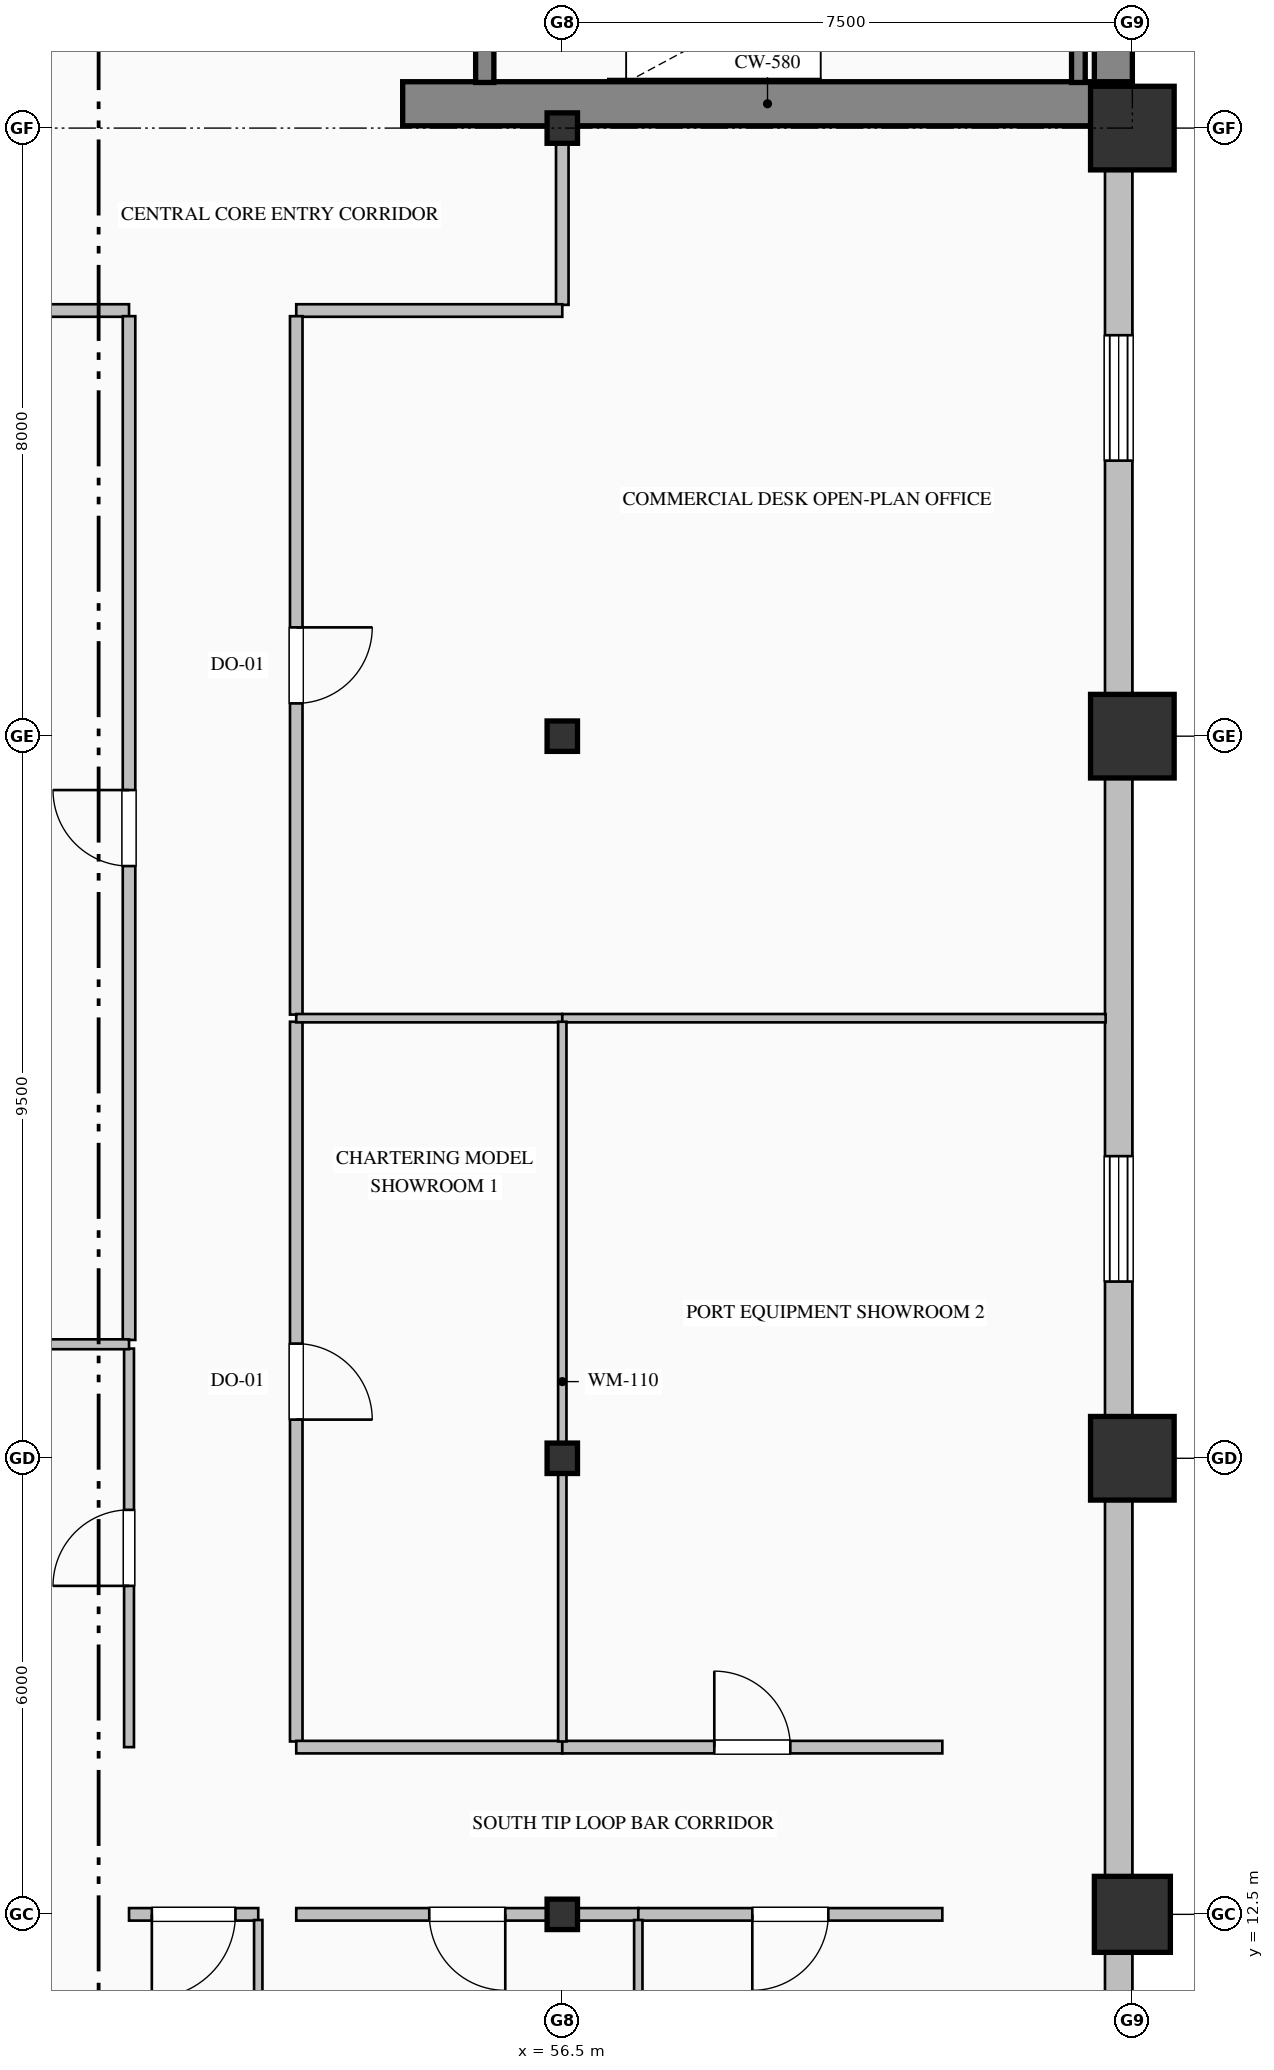
"""IFC4 building model, lengths in metres.
Left out: names, types, materials, properties, quantities, classifications, styles, units other than length and angle.
Written with IfcOpenShell. Run it as: python <this file> out.ifc"""

import sys

from ifc_helpers import new_model, si_unit, direction, frame, frame_2d, origin, origin_2d, place, context, subcontext, project, spatial, rectangle, hollow_rectangle, hollow_circle, i_section, extrude, element, fill, save


model = new_model("IFC4")
c1 = context("Model", 3, precision=1e-05, world=origin(), true_north=direction((0.0, 1.0)))
c2 = subcontext(c1, "Body", "Model", "MODEL_VIEW")
j1 = project(units=[si_unit("LENGTHUNIT", "METRE"), si_unit("PLANEANGLEUNIT", "RADIAN")], contexts=[c1])
p1 = place(None, origin())
s1 = spatial("IfcSite", under=j1, at=p1, CompositionType="ELEMENT")
p2 = place(p1, origin())
s2 = spatial("IfcBuilding", under=s1, at=p2, CompositionType="ELEMENT")
p3 = place(p2, frame((0.0, 0.0, 179.0)))
s3 = spatial("IfcBuildingStorey", under=s2, at=p3, CompositionType="ELEMENT", Elevation=179.0)
p4 = place(p3, frame((63.75, 36.32, 0.0), z_axis=(0.0, 0.0, 1.0), x_axis=(0.0, 1.0, 0.0)))
e1 = element("IfcWall", 1, at=p4, inside=s3, PredefinedType="SHEAR", context=c2, shape_type="SweptSolid", body=[
    extrude(rectangle(XDim=15.18, YDim=0.5, at=frame_2d((7.59, 0.0))), origin(), (0.0, 0.0, 1.0), 3.765),
])
p5 = place(p3, frame((54.4, 36.32, 0.0), z_axis=(0.0, 0.0, 1.0), x_axis=(1.0, 0.0, 0.0)))
e2 = element("IfcWall", 2, at=p5, inside=s3, PredefinedType="SHEAR", context=c2, shape_type="SweptSolid", body=[
    extrude(rectangle(XDim=9.6, YDim=0.58, at=frame_2d((4.8, 0.0))), origin(), (0.0, 0.0, 1.0), 4.0),
])
for number, where, z_axis, x_axis in (
    (3, (56.5, 12.5, 0.0), (0.0, 0.0, 1.0), (1.0, 0.0, 0.0)),
    (4, (56.5, 18.5, 0.0), (0.0, 0.0, 1.0), (1.0, 0.0, 0.0)),
    (5, (56.5, 28.0, 0.0), (0.0, 0.0, 1.0), (1.0, 0.0, 0.0)),
    (6, (56.5, 36.0, 0.0), (0.0, 0.0, 1.0), (1.0, 0.0, 0.0)),
):
    element("IfcColumn", number, at=place(p3, frame(where, z_axis=z_axis, x_axis=x_axis)), inside=s3, PredefinedType="COLUMN", context=c2, shape_type="SweptSolid", body=[
        extrude(i_section(OverallWidth=0.4, OverallDepth=0.4, WebThickness=0.013, FlangeThickness=0.021, FilletRadius=0.022, at=origin_2d()), origin(), (0.0, 0.0, 1.0), 4.0),
    ])
p6 = place(p3, frame((64.0, 12.5, 0.0), z_axis=(0.0, 0.0, 1.0), x_axis=(1.0, 0.0, 0.0)))
e7 = element("IfcColumn", 7, at=p6, inside=s3, PredefinedType="COLUMN", context=c2, shape_type="SweptSolid", body=[
    extrude(hollow_circle(Radius=0.5, WallThickness=0.036, at=origin_2d()), origin(), (0.0, 0.0, 1.0), 4.0),
])
for number, where, z_axis, x_axis in (
    (8, (64.0, 18.5, 0.0), (0.0, 0.0, 1.0), (1.0, 0.0, 0.0)),
    (9, (64.0, 28.0, 0.0), (0.0, 0.0, 1.0), (1.0, 0.0, 0.0)),
    (10, (64.0, 36.0, 0.0), (0.0, 0.0, 1.0), (1.0, 0.0, 0.0)),
):
    element("IfcColumn", number, at=place(p3, frame(where, z_axis=z_axis, x_axis=x_axis)), inside=s3, PredefinedType="COLUMN", context=c2, shape_type="SweptSolid", body=[
        extrude(hollow_rectangle(XDim=1.1, YDim=1.1, WallThickness=0.04, at=origin_2d()), origin(), (0.0, 0.0, 1.0), 4.0),
    ])
p7 = place(p3, frame((63.82, 36.05, 0.0), z_axis=(0.0, 0.0, 1.0), x_axis=(0.0, -1.0, 0.0)))
e11 = element("IfcWall", 11, at=p7, inside=s3, PredefinedType="SOLIDWALL", context=c2, shape_type="SweptSolid", body=[
    extrude(rectangle(XDim=28.05, YDim=0.36, at=frame_2d((14.025, 0.0))), origin(), (0.0, 0.0, 1.0), 3.265),
])
p8 = place(p7, frame((2.775, 0.0, 0.85)))
e12 = element("IfcOpeningElement", 12, at=p8, cuts=e11, PredefinedType="OPENING", context=c2, shape_type="SweptSolid", body=[
    extrude(rectangle(XDim=1.65, YDim=1.95, at=frame_2d((0.825, 0.975))), frame((0.0, 0.19, 0.0), z_axis=(0.0, -1.0, 0.0), x_axis=(1.0, 0.0, 0.0)), (0.0, 0.0, 1.0), 0.38),
])
p9 = place(p7, frame((13.575, 0.0, 0.85)))
e13 = element("IfcOpeningElement", 13, at=p9, cuts=e11, PredefinedType="OPENING", context=c2, shape_type="SweptSolid", body=[
    extrude(rectangle(XDim=1.65, YDim=1.95, at=frame_2d((0.825, 0.975))), frame((0.0, 0.19, 0.0), z_axis=(0.0, -1.0, 0.0), x_axis=(1.0, 0.0, 0.0)), (0.0, 0.0, 1.0), 0.38),
])
p10 = place(p3, frame((55.48, 39.75, 0.0), z_axis=(0.0, 0.0, 1.0), x_axis=(0.0, -1.0, 0.0)))
e14 = element("IfcWall", 14, at=p10, inside=s3, PredefinedType="SOLIDWALL", context=c2, shape_type="SweptSolid", body=[
    extrude(rectangle(XDim=3.15, YDim=0.24, at=frame_2d((1.575, 0.0))), origin(), (0.0, 0.0, 1.0), 4.0),
])
p11 = place(p10, frame((1.0, 0.0, 0.0)))
e15 = element("IfcOpeningElement", 15, at=p11, cuts=e14, PredefinedType="OPENING", context=c2, shape_type="SweptSolid", body=[
    extrude(rectangle(XDim=1.15, YDim=2.2, at=frame_2d((0.575, 1.1))), frame((0.0, 0.13, 0.0), z_axis=(0.0, -1.0, 0.0), x_axis=(1.0, 0.0, 0.0)), (0.0, 0.0, 1.0), 0.26),
])
p12 = place(p3, frame((63.29, 36.6, 0.0), z_axis=(0.0, 0.0, 1.0), x_axis=(0.0, 1.0, 0.0)))
e16 = element("IfcWall", 16, at=p12, inside=s3, PredefinedType="SOLIDWALL", context=c2, shape_type="SweptSolid", body=[
    extrude(rectangle(XDim=3.15, YDim=0.18, at=frame_2d((1.575, 0.0))), origin(), (0.0, 0.0, 1.0), 4.0),
])
p13 = place(p3, frame((56.5, 36.0, 0.0), z_axis=(0.0, 0.0, 1.0), x_axis=(0.0, -1.0, 0.0)))
e17 = element("IfcWall", 17, at=p13, inside=s3, PredefinedType="PARTITIONING", context=c2, shape_type="SweptSolid", body=[
    extrude(rectangle(XDim=2.325, YDim=0.165, at=frame_2d((1.163, 0.0))), origin(), (0.0, 0.0, 1.0), 3.157),
])
p14 = place(p3, frame((56.5, 33.6, 0.0), z_axis=(0.0, 0.0, 1.0), x_axis=(-1.0, 0.0, 0.0)))
e18 = element("IfcWall", 18, at=p14, inside=s3, PredefinedType="PARTITIONING", context=c2, shape_type="SweptSolid", body=[
    extrude(rectangle(XDim=3.5, YDim=0.165, at=frame_2d((1.75, 0.0))), origin(), (0.0, 0.0, 1.0), 3.765),
])
p15 = place(p3, frame((50.8, 33.6, 0.0), z_axis=(0.0, 0.0, 1.0), x_axis=(-1.0, 0.0, 0.0)))
e19 = element("IfcWall", 19, at=p15, inside=s3, PredefinedType="PARTITIONING", context=c2, shape_type="SweptSolid", body=[
    extrude(rectangle(XDim=10.3, YDim=0.165, at=frame_2d((5.15, 0.0))), origin(), (0.0, 0.0, 1.0), 3.765),
])
p16 = place(p3, frame((53.0, 33.525, 0.0), z_axis=(0.0, 0.0, 1.0), x_axis=(0.0, -1.0, 0.0)))
e20 = element("IfcWall", 20, at=p16, inside=s3, PredefinedType="PARTITIONING", context=c2, shape_type="SweptSolid", body=[
    extrude(rectangle(XDim=9.188, YDim=0.165, at=frame_2d((4.594, 0.0))), origin(), (0.0, 0.0, 1.0), 3.765),
])
p17 = place(p16, frame((4.094, 0.0, 0.0)))
e21 = element("IfcOpeningElement", 21, at=p17, cuts=e20, PredefinedType="OPENING", context=c2, shape_type="SweptSolid", body=[
    extrude(rectangle(XDim=1.0, YDim=2.15, at=frame_2d((0.5, 1.075))), frame((0.0, 0.093, 0.0), z_axis=(0.0, -1.0, 0.0), x_axis=(1.0, 0.0, 0.0)), (0.0, 0.0, 1.0), 0.185),
])
p18 = place(p3, frame((53.0, 24.243, 0.0), z_axis=(0.0, 0.0, 1.0), x_axis=(0.0, -1.0, 0.0)))
e22 = element("IfcWall", 22, at=p18, inside=s3, PredefinedType="PARTITIONING", context=c2, shape_type="SweptSolid", body=[
    extrude(rectangle(XDim=9.469, YDim=0.165, at=frame_2d((4.734, 0.0))), origin(), (0.0, 0.0, 1.0), 3.765),
])
p19 = place(p18, frame((4.234, 0.0, 0.0)))
e23 = element("IfcOpeningElement", 23, at=p19, cuts=e22, PredefinedType="OPENING", context=c2, shape_type="SweptSolid", body=[
    extrude(rectangle(XDim=1.0, YDim=2.15, at=frame_2d((0.5, 1.075))), frame((0.0, 0.093, 0.0), z_axis=(0.0, -1.0, 0.0), x_axis=(1.0, 0.0, 0.0)), (0.0, 0.0, 1.0), 0.185),
])
p20 = place(p3, frame((50.8, 14.7, 0.0), z_axis=(0.0, 0.0, 1.0), x_axis=(0.0, 1.0, 0.0)))
e24 = element("IfcWall", 24, at=p20, inside=s3, PredefinedType="PARTITIONING", context=c2, shape_type="SweptSolid", body=[
    extrude(rectangle(XDim=5.243, YDim=0.13, at=frame_2d((2.622, 0.0))), origin(), (0.0, 0.0, 1.0), 3.765),
])
p21 = place(p20, frame((2.122, 0.0, 0.0)))
e25 = element("IfcOpeningElement", 25, at=p21, cuts=e24, PredefinedType="OPENING", context=c2, shape_type="SweptSolid", body=[
    extrude(rectangle(XDim=1.0, YDim=2.15, at=frame_2d((0.5, 1.075))), frame((0.0, 0.075, 0.0), z_axis=(0.0, -1.0, 0.0), x_axis=(1.0, 0.0, 0.0)), (0.0, 0.0, 1.0), 0.15),
])
p22 = place(p3, frame((50.8, 20.057, 0.0), z_axis=(0.0, 0.0, 1.0), x_axis=(0.0, 1.0, 0.0)))
e26 = element("IfcWall", 26, at=p22, inside=s3, PredefinedType="PARTITIONING", context=c2, shape_type="SweptSolid", body=[
    extrude(rectangle(XDim=13.469, YDim=0.165, at=frame_2d((6.734, 0.0))), origin(), (0.0, 0.0, 1.0), 3.765),
])
p23 = place(p22, frame((6.234, 0.0, 0.0)))
e27 = element("IfcOpeningElement", 27, at=p23, cuts=e26, PredefinedType="OPENING", context=c2, shape_type="SweptSolid", body=[
    extrude(rectangle(XDim=1.0, YDim=2.15, at=frame_2d((0.5, 1.075))), frame((0.0, 0.093, 0.0), z_axis=(0.0, -1.0, 0.0), x_axis=(1.0, 0.0, 0.0)), (0.0, 0.0, 1.0), 0.185),
])
p24 = place(p3, frame((52.5, 12.5, 0.0), z_axis=(0.0, 0.0, 1.0), x_axis=(-1.0, 0.0, 0.0)))
e28 = element("IfcWall", 28, at=p24, inside=s3, PredefinedType="PARTITIONING", context=c2, shape_type="SweptSolid", body=[
    extrude(rectangle(XDim=1.7, YDim=0.165, at=frame_2d((0.85, 0.0))), origin(), (0.0, 0.0, 1.0), 3.157),
])
p25 = place(p24, frame((0.3, 0.0, 0.0)))
e29 = element("IfcOpeningElement", 29, at=p25, cuts=e28, PredefinedType="OPENING", context=c2, shape_type="SweptSolid", body=[
    extrude(rectangle(XDim=1.1, YDim=2.2, at=frame_2d((0.55, 1.1))), frame((0.0, 0.093, 0.0), z_axis=(0.0, -1.0, 0.0), x_axis=(1.0, 0.0, 0.0)), (0.0, 0.0, 1.0), 0.185),
])
p26 = place(p3, frame((53.0, 14.7, 0.0), z_axis=(0.0, 0.0, 1.0), x_axis=(1.0, 0.0, 0.0)))
e30 = element("IfcWall", 30, at=p26, inside=s3, PredefinedType="PARTITIONING", context=c2, shape_type="SweptSolid", body=[
    extrude(rectangle(XDim=3.5, YDim=0.165, at=frame_2d((1.75, 0.0))), origin(), (0.0, 0.0, 1.0), 3.765),
])
p27 = place(p3, frame((56.5, 14.7, 0.0), z_axis=(0.0, 0.0, 1.0), x_axis=(1.0, 0.0, 0.0)))
e31 = element("IfcWall", 31, at=p27, inside=s3, PredefinedType="PARTITIONING", context=c2, shape_type="SweptSolid", body=[
    extrude(rectangle(XDim=5.0, YDim=0.165, at=frame_2d((2.5, 0.0))), origin(), (0.0, 0.0, 1.0), 3.765),
])
p28 = place(p27, frame((2.0, 0.0, 0.0)))
e32 = element("IfcOpeningElement", 32, at=p28, cuts=e31, PredefinedType="OPENING", context=c2, shape_type="SweptSolid", body=[
    extrude(rectangle(XDim=1.0, YDim=2.15, at=frame_2d((0.5, 1.075))), frame((0.0, 0.093, 0.0), z_axis=(0.0, -1.0, 0.0), x_axis=(1.0, 0.0, 0.0)), (0.0, 0.0, 1.0), 0.185),
])
p29 = place(p3, frame((57.5, 12.5, 0.0), z_axis=(0.0, 0.0, 1.0), x_axis=(-1.0, 0.0, 0.0)))
e33 = element("IfcWall", 33, at=p29, inside=s3, PredefinedType="PARTITIONING", context=c2, shape_type="SweptSolid", body=[
    extrude(rectangle(XDim=4.5, YDim=0.165, at=frame_2d((2.25, 0.0))), origin(), (0.0, 0.0, 1.0), 3.157),
])
p30 = place(p29, frame((1.75, 0.0, 0.0)))
e34 = element("IfcOpeningElement", 34, at=p30, cuts=e33, PredefinedType="OPENING", context=c2, shape_type="SweptSolid", body=[
    extrude(rectangle(XDim=1.0, YDim=2.15, at=frame_2d((0.5, 1.075))), frame((0.0, 0.093, 0.0), z_axis=(0.0, -1.0, 0.0), x_axis=(1.0, 0.0, 0.0)), (0.0, 0.0, 1.0), 0.185),
])
p31 = place(p3, frame((61.5, 12.5, 0.0), z_axis=(0.0, 0.0, 1.0), x_axis=(-1.0, 0.0, 0.0)))
e35 = element("IfcWall", 35, at=p31, inside=s3, PredefinedType="PARTITIONING", context=c2, shape_type="SweptSolid", body=[
    extrude(rectangle(XDim=4.0, YDim=0.165, at=frame_2d((2.0, 0.0))), origin(), (0.0, 0.0, 1.0), 3.157),
])
p32 = place(p31, frame((1.5, 0.0, 0.0)))
e36 = element("IfcOpeningElement", 36, at=p32, cuts=e35, PredefinedType="OPENING", context=c2, shape_type="SweptSolid", body=[
    extrude(rectangle(XDim=1.0, YDim=2.15, at=frame_2d((0.5, 1.075))), frame((0.0, 0.093, 0.0), z_axis=(0.0, -1.0, 0.0), x_axis=(1.0, 0.0, 0.0)), (0.0, 0.0, 1.0), 0.185),
])
p33 = place(p3, frame((56.5, 24.29, 0.0), z_axis=(0.0, 0.0, 1.0), x_axis=(-1.0, 0.0, 0.0)))
e37 = element("IfcWall", 37, at=p33, inside=s3, PredefinedType="MOVABLE", context=c2, shape_type="SweptSolid", body=[
    extrude(rectangle(XDim=3.5, YDim=0.11, at=frame_2d((1.75, 0.0))), origin(), (0.0, 0.0, 1.0), 3.765),
])
p34 = place(p3, frame((63.648, 24.29, 0.0), z_axis=(0.0, 0.0, 1.0), x_axis=(-1.0, 0.0, 0.0)))
e38 = element("IfcWall", 38, at=p34, inside=s3, PredefinedType="MOVABLE", context=c2, shape_type="SweptSolid", body=[
    extrude(rectangle(XDim=7.148, YDim=0.11, at=frame_2d((3.574, 0.0))), origin(), (0.0, 0.0, 1.0), 3.765),
])
p35 = place(p3, frame((56.5, 24.243, 0.0), z_axis=(0.0, 0.0, 1.0), x_axis=(0.0, -1.0, 0.0)))
e39 = element("IfcWall", 39, at=p35, inside=s3, PredefinedType="MOVABLE", context=c2, shape_type="SweptSolid", body=[
    extrude(rectangle(XDim=9.469, YDim=0.11, at=frame_2d((4.734, 0.0))), origin(), (0.0, 0.0, 1.0), 2.957),
])
p36 = place(p3, frame((40.852, 20.0, 0.0), z_axis=(0.0, 0.0, 1.0), x_axis=(1.0, 0.0, 0.0)))
e40 = element("IfcWall", 40, at=p36, inside=s3, PredefinedType="PARTITIONING", context=c2, shape_type="SweptSolid", body=[
    extrude(rectangle(XDim=9.948, YDim=0.13, at=frame_2d((4.974, 0.0))), origin(), (0.0, 0.0, 1.0), 3.765),
])
for number, where, z_axis, x_axis in (
    (41, (52.5, 12.426, 0.0), (0.0, 0.0, 1.0), (0.0, -1.0, 0.0)),
    (42, (57.5, 12.426, 0.0), (0.0, 0.0, 1.0), (0.0, -1.0, 0.0)),
):
    element("IfcWall", number, at=place(p3, frame(where, z_axis=z_axis, x_axis=x_axis)), inside=s3, PredefinedType="MOVABLE", context=c2, shape_type="SweptSolid", body=[
        extrude(rectangle(XDim=8.073, YDim=0.11, at=frame_2d((4.037, 0.0))), origin(), (0.0, 0.0, 1.0), 3.765),
    ])
p37 = place(p8, origin())
e43 = element("IfcWindow", 43, at=p37, inside=s3, PartitioningType="DOUBLE_PANEL_VERTICAL", PredefinedType="WINDOW", context=c2, shape_type="SweptSolid", body=[
    extrude(rectangle(XDim=1.65, YDim=1.95, at=frame_2d((0.825, 0.975))), frame((0.0, 0.15, 0.0), z_axis=(0.0, -1.0, 0.0), x_axis=(1.0, 0.0, 0.0)), (0.0, 0.0, 1.0), 0.06),
])
fill(e12, e43)
p38 = place(p9, origin())
e44 = element("IfcWindow", 44, at=p38, inside=s3, PartitioningType="DOUBLE_PANEL_VERTICAL", PredefinedType="WINDOW", context=c2, shape_type="SweptSolid", body=[
    extrude(rectangle(XDim=1.65, YDim=1.95, at=frame_2d((0.825, 0.975))), frame((0.0, 0.15, 0.0), z_axis=(0.0, -1.0, 0.0), x_axis=(1.0, 0.0, 0.0)), (0.0, 0.0, 1.0), 0.06),
])
fill(e13, e44)
p39 = place(p17, origin())
e45 = element("IfcDoor", 45, at=p39, inside=s3, OperationType="SINGLE_SWING_LEFT", PredefinedType="DOOR", context=c2, shape_type="SweptSolid", body=[
    extrude(rectangle(XDim=1.0, YDim=2.15, at=frame_2d((0.5, 1.075))), frame((0.0, 0.025, 0.0), z_axis=(0.0, -1.0, 0.0), x_axis=(1.0, 0.0, 0.0)), (0.0, 0.0, 1.0), 0.05),
])
fill(e21, e45)
p40 = place(p19, origin())
e46 = element("IfcDoor", 46, at=p40, inside=s3, OperationType="SINGLE_SWING_RIGHT", PredefinedType="DOOR", context=c2, shape_type="SweptSolid", body=[
    extrude(rectangle(XDim=1.0, YDim=2.15, at=frame_2d((0.5, 1.075))), frame((0.0, 0.025, 0.0), z_axis=(0.0, -1.0, 0.0), x_axis=(1.0, 0.0, 0.0)), (0.0, 0.0, 1.0), 0.05),
])
fill(e23, e46)
p41 = place(p28, origin())
e47 = element("IfcDoor", 47, at=p41, inside=s3, OperationType="SINGLE_SWING_LEFT", PredefinedType="DOOR", context=c2, shape_type="SweptSolid", body=[
    extrude(rectangle(XDim=1.0, YDim=2.15, at=frame_2d((0.5, 1.075))), frame((0.0, 0.025, 0.0), z_axis=(0.0, -1.0, 0.0), x_axis=(1.0, 0.0, 0.0)), (0.0, 0.0, 1.0), 0.05),
])
fill(e32, e47)
p42 = place(p21, origin())
e48 = element("IfcDoor", 48, at=p42, inside=s3, OperationType="SINGLE_SWING_LEFT", PredefinedType="DOOR", context=c2, shape_type="SweptSolid", body=[
    extrude(rectangle(XDim=1.0, YDim=2.15, at=frame_2d((0.5, 1.075))), frame((0.0, 0.025, 0.0), z_axis=(0.0, -1.0, 0.0), x_axis=(1.0, 0.0, 0.0)), (0.0, 0.0, 1.0), 0.05),
])
fill(e25, e48)
p43 = place(p23, origin())
e49 = element("IfcDoor", 49, at=p43, inside=s3, OperationType="SINGLE_SWING_RIGHT", PredefinedType="DOOR", context=c2, shape_type="SweptSolid", body=[
    extrude(rectangle(XDim=1.0, YDim=2.15, at=frame_2d((0.5, 1.075))), frame((0.0, 0.025, 0.0), z_axis=(0.0, -1.0, 0.0), x_axis=(1.0, 0.0, 0.0)), (0.0, 0.0, 1.0), 0.05),
])
fill(e27, e49)
p44 = place(p25, origin())
e50 = element("IfcDoor", 50, at=p44, inside=s3, OperationType="SINGLE_SWING_RIGHT", PredefinedType="DOOR", context=c2, shape_type="SweptSolid", body=[
    extrude(rectangle(XDim=1.1, YDim=2.2, at=frame_2d((0.55, 1.1))), frame((0.0, 0.025, 0.0), z_axis=(0.0, -1.0, 0.0), x_axis=(1.0, 0.0, 0.0)), (0.0, 0.0, 1.0), 0.05),
])
fill(e29, e50)
p45 = place(p30, origin())
e51 = element("IfcDoor", 51, at=p45, inside=s3, OperationType="SINGLE_SWING_LEFT", PredefinedType="DOOR", context=c2, shape_type="SweptSolid", body=[
    extrude(rectangle(XDim=1.0, YDim=2.15, at=frame_2d((0.5, 1.075))), frame((0.0, 0.025, 0.0), z_axis=(0.0, -1.0, 0.0), x_axis=(1.0, 0.0, 0.0)), (0.0, 0.0, 1.0), 0.05),
])
fill(e34, e51)
p46 = place(p32, origin())
e52 = element("IfcDoor", 52, at=p46, inside=s3, OperationType="SINGLE_SWING_RIGHT", PredefinedType="DOOR", context=c2, shape_type="SweptSolid", body=[
    extrude(rectangle(XDim=1.0, YDim=2.15, at=frame_2d((0.5, 1.075))), frame((0.0, 0.025, 0.0), z_axis=(0.0, -1.0, 0.0), x_axis=(1.0, 0.0, 0.0)), (0.0, 0.0, 1.0), 0.05),
])
fill(e36, e52)
save(model, sys.argv[1])
